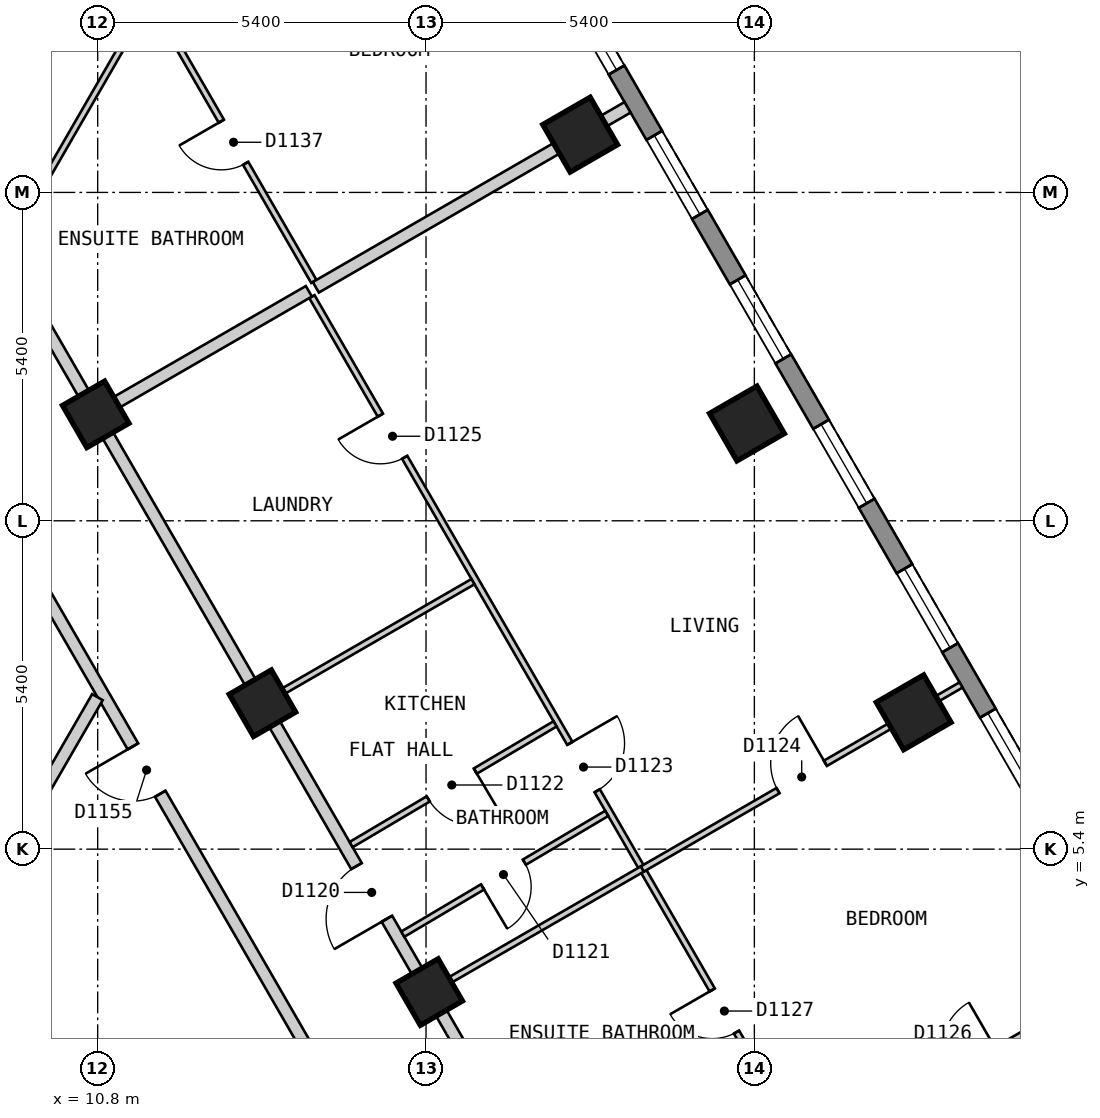
"""IFC4 building model, lengths in metres.
Left out: names, types, materials, properties, quantities, classifications, styles, units other than length and angle.
Written with IfcOpenShell. Run it as: python <this file> out.ifc"""

import sys

from ifc_helpers import new_model, si_unit, direction, frame, frame_2d, origin, origin_2d, place, context, subcontext, project, spatial, polyline, rectangle, outline, extrude, element, fill, save


model = new_model("IFC4")
c1 = context("Model", 3, precision=1e-05, world=origin(), true_north=direction((0.0, 1.0)))
c2 = subcontext(c1, "Body", "Model", "MODEL_VIEW")
j1 = project(units=[si_unit("LENGTHUNIT", "METRE"), si_unit("PLANEANGLEUNIT", "RADIAN")], contexts=[c1])
p1 = place(None, origin())
s1 = spatial("IfcSite", under=j1, at=p1, CompositionType="ELEMENT")
p2 = place(p1, origin())
s2 = spatial("IfcBuilding", under=s1, at=p2, CompositionType="ELEMENT")
p3 = place(p2, frame((0.0, 0.0, 138.6)))
s3 = spatial("IfcBuildingStorey", under=s2, at=p3, CompositionType="ELEMENT", Elevation=138.6)
for number, where, z_axis, x_axis in (
    (1, (24.22, 7.65, 0.0), (0.0, 0.0, 1.0), (-0.5, 0.866, 0.0)),
    (2, (21.478, 12.4, 0.0), (0.0, 0.0, 1.0), (-0.5, 0.866, 0.0)),
    (3, (18.735, 17.15, 0.0), (0.0, 0.0, 1.0), (-0.5, 0.866, 0.0)),
):
    element("IfcColumn", number, at=place(p3, frame(where, z_axis=z_axis, x_axis=x_axis)), inside=s3, PredefinedType="COLUMN", context=c2, shape_type="SweptSolid", body=[
        extrude(rectangle(XDim=0.9, YDim=0.9, at=origin_2d()), origin(), (0.0, 0.0, 1.0), 3.0),
    ])
for number, where, z_axis, x_axis in (
    (4, (16.253, 3.05, 0.0), (0.0, 0.0, 1.0), (-0.5, 0.866, 0.0)),
    (5, (13.51, 7.8, 0.0), (0.0, 0.0, 1.0), (-0.5, 0.866, 0.0)),
    (6, (10.768, 12.55, 0.0), (0.0, 0.0, 1.0), (-0.5, 0.866, 0.0)),
):
    element("IfcColumn", number, at=place(p3, frame(where, z_axis=z_axis, x_axis=x_axis)), inside=s3, PredefinedType="COLUMN", context=c2, shape_type="SweptSolid", body=[
        extrude(rectangle(XDim=0.8, YDim=0.8, at=origin_2d()), origin(), (0.0, 0.0, 1.0), 3.0),
    ])
p4 = place(p3, frame((28.218, 2.825, 0.0), z_axis=(0.0, 0.0, 1.0), x_axis=(-0.500020536353, 0.866013546791, 0.0)))
e7 = element("IfcWall", 7, at=p4, inside=s3, PredefinedType="SOLIDWALL", context=c2, shape_type="SweptSolid", body=[
    extrude(outline(polyline([(0.0, -0.15), (23.325, -0.15), (23.245, 0.15), (0.08, 0.15), (0.0, -0.15)])), origin(), (0.0, 0.0, 1.0), 2.7),
])
p5 = place(p4, frame((1.314, 0.0, 0.15)))
e8 = element("IfcOpeningElement", 8, at=p5, cuts=e7, PredefinedType="OPENING", context=c2, shape_type="SweptSolid", body=[
    extrude(rectangle(XDim=1.5, YDim=2.1, at=frame_2d((0.75, 1.05))), frame((0.0, 0.16, 0.0), z_axis=(0.0, -1.0, 0.0), x_axis=(1.0, 0.0, 0.0)), (0.0, 0.0, 1.0), 0.32),
])
p6 = place(p4, frame((4.056, 0.0, 0.15)))
e9 = element("IfcOpeningElement", 9, at=p6, cuts=e7, PredefinedType="OPENING", context=c2, shape_type="SweptSolid", body=[
    extrude(rectangle(XDim=1.5, YDim=2.1, at=frame_2d((0.75, 1.05))), frame((0.0, 0.16, 0.0), z_axis=(0.0, -1.0, 0.0), x_axis=(1.0, 0.0, 0.0)), (0.0, 0.0, 1.0), 0.32),
])
p7 = place(p4, frame((6.798, 0.0, 0.15)))
e10 = element("IfcOpeningElement", 10, at=p7, cuts=e7, PredefinedType="OPENING", context=c2, shape_type="SweptSolid", body=[
    extrude(rectangle(XDim=1.5, YDim=2.1, at=frame_2d((0.75, 1.05))), frame((0.0, 0.16, 0.0), z_axis=(0.0, -1.0, 0.0), x_axis=(1.0, 0.0, 0.0)), (0.0, 0.0, 1.0), 0.32),
])
p8 = place(p4, frame((9.541, 0.0, 0.15)))
e11 = element("IfcOpeningElement", 11, at=p8, cuts=e7, PredefinedType="OPENING", context=c2, shape_type="SweptSolid", body=[
    extrude(rectangle(XDim=1.5, YDim=2.1, at=frame_2d((0.75, 1.05))), frame((0.0, 0.16, 0.0), z_axis=(0.0, -1.0, 0.0), x_axis=(1.0, 0.0, 0.0)), (0.0, 0.0, 1.0), 0.32),
])
p9 = place(p4, frame((12.284, 0.0, 0.15)))
e12 = element("IfcOpeningElement", 12, at=p9, cuts=e7, PredefinedType="OPENING", context=c2, shape_type="SweptSolid", body=[
    extrude(rectangle(XDim=1.5, YDim=2.1, at=frame_2d((0.75, 1.05))), frame((0.0, 0.16, 0.0), z_axis=(0.0, -1.0, 0.0), x_axis=(1.0, 0.0, 0.0)), (0.0, 0.0, 1.0), 0.32),
])
p10 = place(p4, frame((15.027, 0.0, 0.15)))
e13 = element("IfcOpeningElement", 13, at=p10, cuts=e7, PredefinedType="OPENING", context=c2, shape_type="SweptSolid", body=[
    extrude(rectangle(XDim=1.5, YDim=2.1, at=frame_2d((0.75, 1.05))), frame((0.0, 0.16, 0.0), z_axis=(0.0, -1.0, 0.0), x_axis=(1.0, 0.0, 0.0)), (0.0, 0.0, 1.0), 0.32),
])
p11 = place(p4, frame((17.769, 0.0, 0.15)))
e14 = element("IfcOpeningElement", 14, at=p11, cuts=e7, PredefinedType="OPENING", context=c2, shape_type="SweptSolid", body=[
    extrude(rectangle(XDim=1.5, YDim=2.1, at=frame_2d((0.75, 1.05))), frame((0.0, 0.16, 0.0), z_axis=(0.0, -1.0, 0.0), x_axis=(1.0, 0.0, 0.0)), (0.0, 0.0, 1.0), 0.32),
])
p12 = place(p4, frame((20.511, 0.0, 0.15)))
e15 = element("IfcOpeningElement", 15, at=p12, cuts=e7, PredefinedType="OPENING", context=c2, shape_type="SweptSolid", body=[
    extrude(rectangle(XDim=1.5, YDim=2.1, at=frame_2d((0.75, 1.05))), frame((0.0, 0.16, 0.0), z_axis=(0.0, -1.0, 0.0), x_axis=(1.0, 0.0, 0.0)), (0.0, 0.0, 1.0), 0.32),
])
p13 = place(p3, frame((7.967, 13.0, 0.0), z_axis=(0.0, 0.0, 1.0), x_axis=(0.50003774998, -0.866003607726, 0.0)))
e16 = element("IfcWall", 16, at=p13, inside=s3, PredefinedType="PARTITIONING", context=c2, shape_type="SweptSolid", body=[
    extrude(rectangle(XDim=14.433, YDim=0.2, at=frame_2d((7.217, 0.0))), origin(), (0.0, 0.0, 1.0), 2.7),
])
p14 = place(p13, frame((6.824, 0.0, 0.0)))
e17 = element("IfcOpeningElement", 17, at=p14, cuts=e16, PredefinedType="OPENING", context=c2, shape_type="SweptSolid", body=[
    extrude(rectangle(XDim=0.9, YDim=2.1, at=frame_2d((0.45, 1.05))), frame((0.0, 0.11, 0.0), z_axis=(0.0, -1.0, 0.0), x_axis=(1.0, 0.0, 0.0)), (0.0, 0.0, 1.0), 0.22),
])
p15 = place(p3, frame((9.296, 15.1, 0.0), z_axis=(0.0, 0.0, 1.0), x_axis=(0.499974024244, -0.866040400375, 0.0)))
e18 = element("IfcWall", 18, at=p15, inside=s3, PredefinedType="PARTITIONING", context=c2, shape_type="SweptSolid", body=[
    extrude(rectangle(XDim=16.857, YDim=0.2, at=frame_2d((8.429, 0.0))), origin(), (0.0, 0.0, 1.0), 2.7),
])
p16 = place(p15, frame((11.522, 0.0, 0.0)))
e19 = element("IfcOpeningElement", 19, at=p16, cuts=e18, PredefinedType="OPENING", context=c2, shape_type="SweptSolid", body=[
    extrude(rectangle(XDim=1.0, YDim=2.1, at=frame_2d((0.5, 1.05))), frame((0.0, 0.11, 0.0), z_axis=(0.0, -1.0, 0.0), x_axis=(1.0, 0.0, 0.0)), (0.0, 0.0, 1.0), 0.22),
])
p17 = place(p3, frame((7.028, 1.373, 0.0), z_axis=(0.0, 0.0, 1.0), x_axis=(0.499954271211, 0.866051803703, 0.0)))
e20 = element("IfcWall", 20, at=p17, inside=s3, PredefinedType="PARTITIONING", context=c2, shape_type="SweptSolid", body=[
    extrude(rectangle(XDim=7.536, YDim=0.2, at=frame_2d((3.768, 0.0))), origin(), (0.0, 0.0, 1.0), 2.7),
])
p18 = place(p3, frame((14.323, 14.487, 0.0), z_axis=(0.0, 0.0, 1.0), x_axis=(0.500011052545, -0.866019022501, 0.0)))
e21 = element("IfcWall", 21, at=p18, inside=s3, PredefinedType="PARTITIONING", context=c2, shape_type="SweptSolid", body=[
    extrude(rectangle(XDim=16.208, YDim=0.1, at=frame_2d((8.104, 0.0))), origin(), (0.0, 0.0, 1.0), 2.7),
])
p19 = place(p18, frame((8.484, 0.0, 0.0)))
e22 = element("IfcOpeningElement", 22, at=p19, cuts=e21, PredefinedType="OPENING", context=c2, shape_type="SweptSolid", body=[
    extrude(rectangle(XDim=0.9, YDim=2.1, at=frame_2d((0.45, 1.05))), frame((0.0, 0.06, 0.0), z_axis=(0.0, -1.0, 0.0), x_axis=(1.0, 0.0, 0.0)), (0.0, 0.0, 1.0), 0.12),
])
p20 = place(p18, frame((2.252, 0.0, 0.0)))
e23 = element("IfcOpeningElement", 23, at=p20, cuts=e21, PredefinedType="OPENING", context=c2, shape_type="SweptSolid", body=[
    extrude(rectangle(XDim=0.8, YDim=2.1, at=frame_2d((0.4, 1.05))), frame((0.0, 0.06, 0.0), z_axis=(0.0, -1.0, 0.0), x_axis=(1.0, 0.0, 0.0)), (0.0, 0.0, 1.0), 0.12),
])
p21 = place(p18, frame((13.167, 0.0, 0.0)))
e24 = element("IfcOpeningElement", 24, at=p21, cuts=e21, PredefinedType="OPENING", context=c2, shape_type="SweptSolid", body=[
    extrude(rectangle(XDim=0.8, YDim=2.1, at=frame_2d((0.4, 1.05))), frame((0.0, 0.06, 0.0), z_axis=(0.0, -1.0, 0.0), x_axis=(1.0, 0.0, 0.0)), (0.0, 0.0, 1.0), 0.12),
])
p22 = place(p3, frame((11.713, 19.313, 0.0), z_axis=(0.0, 0.0, 1.0), x_axis=(0.499945064984, -0.866057118208, 0.0)))
e25 = element("IfcWall", 25, at=p22, inside=s3, PredefinedType="PARTITIONING", context=c2, shape_type="SweptSolid", body=[
    extrude(rectangle(XDim=5.285, YDim=0.1, at=frame_2d((2.642, 0.0))), origin(), (0.0, 0.0, 1.0), 2.7),
])
p23 = place(p22, frame((2.242, 0.0, 0.0)))
e26 = element("IfcOpeningElement", 26, at=p23, cuts=e25, PredefinedType="OPENING", context=c2, shape_type="SweptSolid", body=[
    extrude(rectangle(XDim=0.8, YDim=2.1, at=frame_2d((0.4, 1.05))), frame((0.0, 0.06, 0.0), z_axis=(0.0, -1.0, 0.0), x_axis=(1.0, 0.0, 0.0)), (0.0, 0.0, 1.0), 0.12),
])
p24 = place(p3, frame((9.238, 15.2, 0.0), z_axis=(0.0, 0.0, 1.0), x_axis=(0.499988022762, 0.866032318735, 0.0)))
e27 = element("IfcWall", 27, at=p24, inside=s3, PredefinedType="PARTITIONING", context=c2, shape_type="SweptSolid", body=[
    extrude(rectangle(XDim=4.748, YDim=0.1, at=frame_2d((2.374, 0.0))), origin(), (0.0, 0.0, 1.0), 2.7),
])
p25 = place(p3, frame((16.339, 3.1, 0.0), z_axis=(0.0, 0.0, 1.0), x_axis=(0.866031112038, 0.499990112884, 0.0)))
e28 = element("IfcWall", 28, at=p25, inside=s3, PredefinedType="PARTITIONING", context=c2, shape_type="SweptSolid", body=[
    extrude(rectangle(XDim=3.948, YDim=0.1, at=frame_2d((1.974, 0.0))), origin(), (0.0, 0.0, 1.0), 2.7),
])
p26 = place(p3, frame((22.634, 0.401, 0.0), z_axis=(0.0, 0.0, 1.0), x_axis=(0.86601325737, 0.500021037617, 0.0)))
e29 = element("IfcWall", 29, at=p26, inside=s3, PredefinedType="PARTITIONING", context=c2, shape_type="SweptSolid", body=[
    extrude(rectangle(XDim=5.898, YDim=0.1, at=frame_2d((2.949, 0.0))), origin(), (0.0, 0.0, 1.0), 2.7),
])
p27 = place(p26, frame((2.499, 0.0, 0.0)))
e30 = element("IfcOpeningElement", 30, at=p27, cuts=e29, PredefinedType="OPENING", context=c2, shape_type="SweptSolid", body=[
    extrude(rectangle(XDim=0.9, YDim=2.1, at=frame_2d((0.45, 1.05))), frame((0.0, 0.06, 0.0), z_axis=(0.0, -1.0, 0.0), x_axis=(1.0, 0.0, 0.0)), (0.0, 0.0, 1.0), 0.12),
])
p28 = place(p3, frame((13.597, 7.85, 0.0), z_axis=(0.0, 0.0, 1.0), x_axis=(0.865979019114, 0.500080332001, 0.0)))
e31 = element("IfcWall", 31, at=p28, inside=s3, PredefinedType="PARTITIONING", context=c2, shape_type="SweptSolid", body=[
    extrude(rectangle(XDim=3.897, YDim=0.1, at=frame_2d((1.949, 0.0))), origin(), (0.0, 0.0, 1.0), 2.7),
])
p29 = place(p3, frame((15.818, 4.002, 0.0), z_axis=(0.0, 0.0, 1.0), x_axis=(0.860457323494, 0.509522516132, 0.0)))
e32 = element("IfcWall", 32, at=p29, inside=s3, PredefinedType="PARTITIONING", context=c2, shape_type="SweptSolid", body=[
    extrude(rectangle(XDim=3.898, YDim=0.1, at=frame_2d((1.949, 0.0))), origin(), (0.0, 0.0, 1.0), 2.7),
])
p30 = place(p29, frame((1.524, 0.0, 0.0)))
e33 = element("IfcOpeningElement", 33, at=p30, cuts=e32, PredefinedType="OPENING", context=c2, shape_type="SweptSolid", body=[
    extrude(rectangle(XDim=0.8, YDim=2.1, at=frame_2d((0.4, 1.05))), frame((0.0, 0.06, 0.0), z_axis=(0.0, -1.0, 0.0), x_axis=(1.0, 0.0, 0.0)), (0.0, 0.0, 1.0), 0.12),
])
p31 = place(p3, frame((14.968, 5.475, 0.0), z_axis=(0.0, 0.0, 1.0), x_axis=(0.860594613521, 0.509290596005, 0.0)))
e34 = element("IfcWall", 34, at=p31, inside=s3, PredefinedType="PARTITIONING", context=c2, shape_type="SweptSolid", body=[
    extrude(rectangle(XDim=3.897, YDim=0.1, at=frame_2d((1.949, 0.0))), origin(), (0.0, 0.0, 1.0), 2.7),
])
p32 = place(p31, frame((1.474, 0.0, 0.0)))
e35 = element("IfcOpeningElement", 35, at=p32, cuts=e34, PredefinedType="OPENING", context=c2, shape_type="SweptSolid", body=[
    extrude(rectangle(XDim=0.9, YDim=2.1, at=frame_2d((0.45, 1.05))), frame((0.0, 0.06, 0.0), z_axis=(0.0, -1.0, 0.0), x_axis=(1.0, 0.0, 0.0)), (0.0, 0.0, 1.0), 0.12),
])
p33 = place(p3, frame((10.854, 12.6, 0.0), z_axis=(0.0, 0.0, 1.0), x_axis=(0.866031112038, 0.499990112884, 0.0)))
e36 = element("IfcWall", 36, at=p33, inside=s3, PredefinedType="PARTITIONING", context=c2, shape_type="SweptSolid", body=[
    extrude(rectangle(XDim=3.948, YDim=0.2, at=frame_2d((1.974, 0.0))), origin(), (0.0, 0.0, 1.0), 2.7),
])
p34 = place(p3, frame((14.388, 14.64, 0.0), z_axis=(0.0, 0.0, 1.0), x_axis=(0.866044090212, 0.499967632761, 0.0)))
e37 = element("IfcWall", 37, at=p34, inside=s3, PredefinedType="PARTITIONING", context=c2, shape_type="SweptSolid", body=[
    extrude(rectangle(XDim=5.919, YDim=0.2, at=frame_2d((2.959, 0.0))), origin(), (0.0, 0.0, 1.0), 2.7),
])
p35 = place(p3, frame((19.758, 5.074, 0.0), z_axis=(0.0, 0.0, 1.0), x_axis=(0.866007554612, 0.500030914399, 0.0)))
e38 = element("IfcWall", 38, at=p35, inside=s3, PredefinedType="PARTITIONING", context=c2, shape_type="SweptSolid", body=[
    extrude(rectangle(XDim=6.052, YDim=0.1, at=frame_2d((3.026, 0.0))), origin(), (0.0, 0.0, 1.0), 2.7),
])
p36 = place(p35, frame((2.576, 0.0, 0.0)))
e39 = element("IfcOpeningElement", 39, at=p36, cuts=e38, PredefinedType="OPENING", context=c2, shape_type="SweptSolid", body=[
    extrude(rectangle(XDim=0.9, YDim=2.1, at=frame_2d((0.45, 1.05))), frame((0.0, 0.06, 0.0), z_axis=(0.0, -1.0, 0.0), x_axis=(1.0, 0.0, 0.0)), (0.0, 0.0, 1.0), 0.12),
])
p37 = place(p6, origin())
e40 = element("IfcWindow", 40, at=p37, inside=s3, PartitioningType="SINGLE_PANEL", PredefinedType="WINDOW", context=c2, shape_type="SweptSolid", body=[
    extrude(rectangle(XDim=1.5, YDim=2.1, at=frame_2d((0.75, 1.05))), frame((0.0, 0.03, 0.0), z_axis=(0.0, -1.0, 0.0), x_axis=(1.0, 0.0, 0.0)), (0.0, 0.0, 1.0), 0.06),
])
fill(e9, e40)
p38 = place(p7, origin())
e41 = element("IfcWindow", 41, at=p38, inside=s3, PartitioningType="SINGLE_PANEL", PredefinedType="WINDOW", context=c2, shape_type="SweptSolid", body=[
    extrude(rectangle(XDim=1.5, YDim=2.1, at=frame_2d((0.75, 1.05))), frame((0.0, 0.03, 0.0), z_axis=(0.0, -1.0, 0.0), x_axis=(1.0, 0.0, 0.0)), (0.0, 0.0, 1.0), 0.06),
])
fill(e10, e41)
p39 = place(p8, origin())
e42 = element("IfcWindow", 42, at=p39, inside=s3, PartitioningType="SINGLE_PANEL", PredefinedType="WINDOW", context=c2, shape_type="SweptSolid", body=[
    extrude(rectangle(XDim=1.5, YDim=2.1, at=frame_2d((0.75, 1.05))), frame((0.0, 0.03, 0.0), z_axis=(0.0, -1.0, 0.0), x_axis=(1.0, 0.0, 0.0)), (0.0, 0.0, 1.0), 0.06),
])
fill(e11, e42)
p40 = place(p9, origin())
e43 = element("IfcWindow", 43, at=p40, inside=s3, PartitioningType="SINGLE_PANEL", PredefinedType="WINDOW", context=c2, shape_type="SweptSolid", body=[
    extrude(rectangle(XDim=1.5, YDim=2.1, at=frame_2d((0.75, 1.05))), frame((0.0, 0.03, 0.0), z_axis=(0.0, -1.0, 0.0), x_axis=(1.0, 0.0, 0.0)), (0.0, 0.0, 1.0), 0.06),
])
fill(e12, e43)
p41 = place(p10, origin())
e44 = element("IfcWindow", 44, at=p41, inside=s3, PartitioningType="SINGLE_PANEL", PredefinedType="WINDOW", context=c2, shape_type="SweptSolid", body=[
    extrude(rectangle(XDim=1.5, YDim=2.1, at=frame_2d((0.75, 1.05))), frame((0.0, 0.03, 0.0), z_axis=(0.0, -1.0, 0.0), x_axis=(1.0, 0.0, 0.0)), (0.0, 0.0, 1.0), 0.06),
])
fill(e13, e44)
p42 = place(p11, origin())
e45 = element("IfcWindow", 45, at=p42, inside=s3, PartitioningType="SINGLE_PANEL", PredefinedType="WINDOW", context=c2, shape_type="SweptSolid", body=[
    extrude(rectangle(XDim=1.5, YDim=2.1, at=frame_2d((0.75, 1.05))), frame((0.0, 0.03, 0.0), z_axis=(0.0, -1.0, 0.0), x_axis=(1.0, 0.0, 0.0)), (0.0, 0.0, 1.0), 0.06),
])
fill(e14, e45)
p43 = place(p16, origin())
e46 = element("IfcDoor", 46, at=p43, inside=s3, OperationType="SINGLE_SWING_RIGHT", PredefinedType="DOOR", context=c2, shape_type="SweptSolid", body=[
    extrude(rectangle(XDim=1.0, YDim=2.1, at=frame_2d((0.5, 1.05))), frame((0.0, 0.025, 0.0), z_axis=(0.0, -1.0, 0.0), x_axis=(1.0, 0.0, 0.0)), (0.0, 0.0, 1.0), 0.05),
])
fill(e19, e46)
p44 = place(p30, origin())
e47 = element("IfcDoor", 47, at=p44, inside=s3, OperationType="SINGLE_SWING_LEFT", PredefinedType="DOOR", context=c2, shape_type="SweptSolid", body=[
    extrude(rectangle(XDim=0.8, YDim=2.1, at=frame_2d((0.4, 1.05))), frame((0.0, 0.025, 0.0), z_axis=(0.0, -1.0, 0.0), x_axis=(1.0, 0.0, 0.0)), (0.0, 0.0, 1.0), 0.05),
])
fill(e33, e47)
p45 = place(p32, origin())
e48 = element("IfcDoor", 48, at=p45, inside=s3, OperationType="SINGLE_SWING_RIGHT", PredefinedType="DOOR", context=c2, shape_type="SweptSolid", body=[
    extrude(rectangle(XDim=0.9, YDim=2.1, at=frame_2d((0.45, 1.05))), frame((0.0, 0.025, 0.0), z_axis=(0.0, -1.0, 0.0), x_axis=(1.0, 0.0, 0.0)), (0.0, 0.0, 1.0), 0.05),
])
fill(e35, e48)
p46 = place(p19, origin())
e49 = element("IfcDoor", 49, at=p46, inside=s3, OperationType="SINGLE_SWING_LEFT", PredefinedType="DOOR", context=c2, shape_type="SweptSolid", body=[
    extrude(rectangle(XDim=0.9, YDim=2.1, at=frame_2d((0.45, 1.05))), frame((0.0, 0.025, 0.0), z_axis=(0.0, -1.0, 0.0), x_axis=(1.0, 0.0, 0.0)), (0.0, 0.0, 1.0), 0.05),
])
fill(e22, e49)
p47 = place(p36, origin())
e50 = element("IfcDoor", 50, at=p47, inside=s3, OperationType="SINGLE_SWING_RIGHT", PredefinedType="DOOR", context=c2, shape_type="SweptSolid", body=[
    extrude(rectangle(XDim=0.9, YDim=2.1, at=frame_2d((0.45, 1.05))), frame((0.0, 0.025, 0.0), z_axis=(0.0, -1.0, 0.0), x_axis=(1.0, 0.0, 0.0)), (0.0, 0.0, 1.0), 0.05),
])
fill(e39, e50)
p48 = place(p20, origin())
e51 = element("IfcDoor", 51, at=p48, inside=s3, OperationType="SINGLE_SWING_LEFT", PredefinedType="DOOR", context=c2, shape_type="SweptSolid", body=[
    extrude(rectangle(XDim=0.8, YDim=2.1, at=frame_2d((0.4, 1.05))), frame((0.0, 0.025, 0.0), z_axis=(0.0, -1.0, 0.0), x_axis=(1.0, 0.0, 0.0)), (0.0, 0.0, 1.0), 0.05),
])
fill(e23, e51)
p49 = place(p21, origin())
e52 = element("IfcDoor", 52, at=p49, inside=s3, OperationType="SINGLE_SWING_LEFT", PredefinedType="DOOR", context=c2, shape_type="SweptSolid", body=[
    extrude(rectangle(XDim=0.8, YDim=2.1, at=frame_2d((0.4, 1.05))), frame((0.0, 0.025, 0.0), z_axis=(0.0, -1.0, 0.0), x_axis=(1.0, 0.0, 0.0)), (0.0, 0.0, 1.0), 0.05),
])
fill(e24, e52)
p50 = place(p23, origin())
e53 = element("IfcDoor", 53, at=p50, inside=s3, OperationType="SINGLE_SWING_LEFT", PredefinedType="DOOR", context=c2, shape_type="SweptSolid", body=[
    extrude(rectangle(XDim=0.8, YDim=2.1, at=frame_2d((0.4, 1.05))), frame((0.0, 0.025, 0.0), z_axis=(0.0, -1.0, 0.0), x_axis=(1.0, 0.0, 0.0)), (0.0, 0.0, 1.0), 0.05),
])
fill(e26, e53)
p51 = place(p14, origin())
e54 = element("IfcDoor", 54, at=p51, inside=s3, OperationType="SINGLE_SWING_LEFT", PredefinedType="DOOR", context=c2, shape_type="SweptSolid", body=[
    extrude(rectangle(XDim=0.9, YDim=2.1, at=frame_2d((0.45, 1.05))), frame((0.0, 0.025, 0.0), z_axis=(0.0, -1.0, 0.0), x_axis=(1.0, 0.0, 0.0)), (0.0, 0.0, 1.0), 0.05),
])
fill(e17, e54)
save(model, sys.argv[1])
